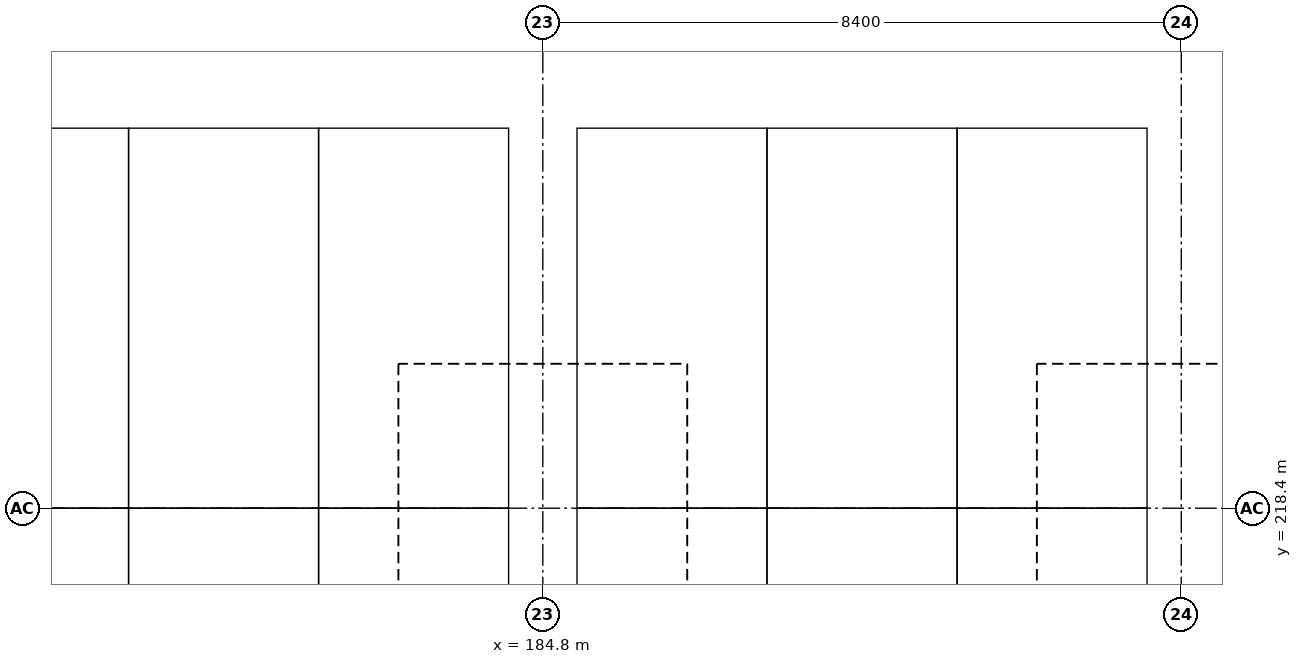
"""IFC4 building model, lengths in metres.
Left out: names, types, materials, properties, quantities, classifications, styles, units other than length and angle.
Written with IfcOpenShell. Run it as: python <this file> out.ifc"""

import sys

from ifc_helpers import new_model, si_unit, direction, frame, origin, origin_2d, place, context, subcontext, project, spatial, rectangle, extrude, element, save


model = new_model("IFC4")
c1 = context("Model", 3, precision=1e-05, world=origin(), true_north=direction((0.0, 1.0)))
c2 = subcontext(c1, "Body", "Model", "MODEL_VIEW")
j1 = project(units=[si_unit("LENGTHUNIT", "METRE"), si_unit("PLANEANGLEUNIT", "RADIAN")], contexts=[c1])
p1 = place(None, origin())
s1 = spatial("IfcSite", under=j1, at=p1, CompositionType="ELEMENT")
p2 = place(p1, origin())
s2 = spatial("IfcBuilding", under=s1, at=p2, CompositionType="ELEMENT")
p3 = place(p2, frame((0.0, 0.0, -3.0)))
s3 = spatial("IfcBuildingStorey", under=s2, at=p3, CompositionType="ELEMENT", Elevation=-3.0)
for number, where, z_axis, x_axis in (
    (1, (184.8, 218.4, 0.0), (0.0, 0.0, 1.0), (1.0, 0.0, 0.0)),
    (2, (193.2, 218.4, 0.0), (0.0, 0.0, 1.0), (1.0, 0.0, 0.0)),
):
    element("IfcColumn", number, at=place(p3, frame(where, z_axis=z_axis, x_axis=x_axis)), inside=s3, PredefinedType="COLUMN", context=c2, shape_type="SweptSolid", body=[
        extrude(rectangle(XDim=0.8, YDim=0.8, at=origin_2d()), origin(), (0.0, 0.0, 1.0), 2.4),
    ])
save(model, sys.argv[1])
